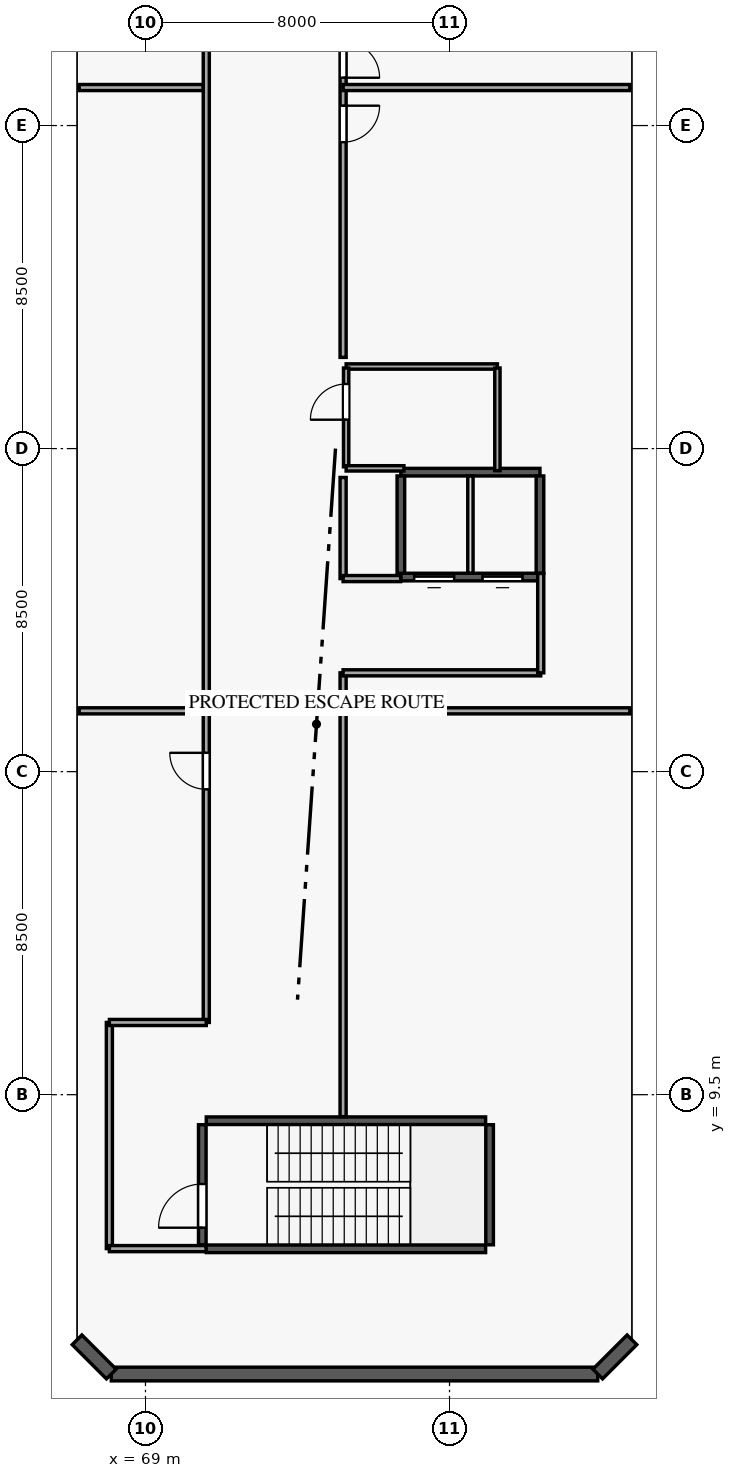
"""IFC4 building model, lengths in metres.
Left out: names, types, materials, properties, quantities, classifications, styles, units other than length and angle.
Written with IfcOpenShell. Run it as: python <this file> out.ifc"""

import sys

from ifc_helpers import new_model, si_unit, direction, frame, frame_2d, origin, origin_with_axes, origin_2d, place, context, subcontext, project, spatial, rectangle, circle, extrude, source, transform, mapped, element, fill, save


model = new_model("IFC4")
c1 = context("Model", 3, precision=1e-05, world=origin(), true_north=direction((0.0, 1.0)))
c2 = subcontext(c1, "Body", "Model", "MODEL_VIEW")
j1 = project(units=[si_unit("LENGTHUNIT", "METRE"), si_unit("PLANEANGLEUNIT", "RADIAN")], contexts=[c1])
p1 = place(None, origin())
s1 = spatial("IfcSite", under=j1, at=p1, CompositionType="ELEMENT")
p2 = place(p1, origin())
s2 = spatial("IfcBuilding", under=s1, at=p2, CompositionType="ELEMENT")
p3 = place(p2, frame((0.0, 0.0, 9.0)))
s3 = spatial("IfcBuildingStorey", under=s2, at=p3, CompositionType="ELEMENT", Elevation=9.0)
m1 = source(origin_with_axes(), c2, "Body", "SweptSolid", [
    extrude(circle(Radius=0.375, at=origin_2d()), origin(), (0.0, 0.0, 1.0), 4.5),
])
for number, where, z_axis, x_axis in (
    (1, (69.6, 3.05, 0.0), (0.0, 0.0, 1.0), (1.0, 0.0, 0.0)),
    (2, (75.4, 3.05, 0.0), (0.0, 0.0, 1.0), (1.0, 0.0, 0.0)),
    (3, (81.2, 3.05, 0.0), (0.0, 0.0, 1.0), (1.0, 0.0, 0.0)),
    (4, (69.6, 4.8, 0.0), (0.0, 0.0, 1.0), (1.0, 0.0, 0.0)),
    (5, (69.6, 12.0, 0.0), (0.0, 0.0, 1.0), (1.0, 0.0, 0.0)),
    (6, (69.6, 19.2, 0.0), (0.0, 0.0, 1.0), (1.0, 0.0, 0.0)),
    (7, (69.6, 26.5, 0.0), (0.0, 0.0, 1.0), (1.0, 0.0, 0.0)),
    (8, (69.6, 33.8, 0.0), (0.0, 0.0, 1.0), (1.0, 0.0, 0.0)),
):
    element("IfcColumn", number, at=place(p3, frame(where, z_axis=z_axis, x_axis=x_axis)), inside=s3, PredefinedType="COLUMN", context=c2, shape_type="MappedRepresentation", body=[
        mapped(m1, transform((0.0, 0.0, 0.0), scale=1.0)),
    ])
m2 = source(origin_with_axes(), c2, "Body", "SweptSolid", [
    extrude(circle(Radius=0.425, at=origin_2d()), origin(), (0.0, 0.0, 1.0), 4.5),
])
for number, where, z_axis, x_axis in (
    (9, (75.4, 4.8, 0.0), (0.0, 0.0, 1.0), (1.0, 0.0, 0.0)),
    (10, (75.4, 12.0, 0.0), (0.0, 0.0, 1.0), (1.0, 0.0, 0.0)),
    (11, (75.4, 19.2, 0.0), (0.0, 0.0, 1.0), (1.0, 0.0, 0.0)),
    (12, (75.4, 26.5, 0.0), (0.0, 0.0, 1.0), (1.0, 0.0, 0.0)),
    (13, (75.4, 33.8, 0.0), (0.0, 0.0, 1.0), (1.0, 0.0, 0.0)),
):
    element("IfcColumn", number, at=place(p3, frame(where, z_axis=z_axis, x_axis=x_axis)), inside=s3, PredefinedType="COLUMN", context=c2, shape_type="MappedRepresentation", body=[
        mapped(m2, transform((0.0, 0.0, 0.0), scale=1.0)),
    ])
for number, where, z_axis, x_axis in (
    (14, (81.2, 4.8, 0.0), (0.0, 0.0, 1.0), (1.0, 0.0, 0.0)),
    (15, (81.2, 12.0, 0.0), (0.0, 0.0, 1.0), (1.0, 0.0, 0.0)),
    (16, (81.2, 19.2, 0.0), (0.0, 0.0, 1.0), (1.0, 0.0, 0.0)),
    (17, (81.2, 26.5, 0.0), (0.0, 0.0, 1.0), (1.0, 0.0, 0.0)),
    (18, (81.2, 33.8, 0.0), (0.0, 0.0, 1.0), (1.0, 0.0, 0.0)),
):
    element("IfcColumn", number, at=place(p3, frame(where, z_axis=z_axis, x_axis=x_axis)), inside=s3, PredefinedType="COLUMN", context=c2, shape_type="MappedRepresentation", body=[
        mapped(m1, transform((0.0, 0.0, 0.0), scale=1.0)),
    ])
m3 = source(origin_with_axes(), c2, "Body", "SweptSolid", [
    extrude(rectangle(XDim=0.5, YDim=0.75, at=origin_2d()), origin(), (0.0, 0.0, 1.0), 4.5),
])
p4 = place(p3, frame((72.5, 12.0, 0.0), z_axis=(0.0, 0.0, 1.0), x_axis=(1.0, 0.0, 0.0)))
e19 = element("IfcColumn", 19, at=p4, inside=s3, PredefinedType="PILASTER", context=c2, shape_type="MappedRepresentation", body=[
    mapped(m3, transform((0.0, 0.0, 0.0), scale=1.0)),
])
p5 = place(p3, frame((68.1, 2.15, 0.0), z_axis=(0.0, 0.0, 1.0), x_axis=(1.0, 0.0, 0.0)))
e20 = element("IfcWall", 20, at=p5, inside=s3, PredefinedType="SOLIDWALL", context=c2, shape_type="SweptSolid", body=[
    extrude(rectangle(XDim=12.8, YDim=0.36, at=frame_2d((6.4, 0.0))), origin(), (0.0, 0.0, 1.0), 4.2),
])
p6 = place(p5, frame((2.675, 0.0, 0.85)))
e21 = element("IfcOpeningElement", 21, at=p6, cuts=e20, PredefinedType="OPENING", context=c2, shape_type="SweptSolid", body=[
    extrude(rectangle(XDim=1.6, YDim=2.2, at=frame_2d((0.8, 1.1))), frame((0.0, 0.19, 0.0), z_axis=(0.0, -1.0, 0.0), x_axis=(1.0, 0.0, 0.0)), (0.0, 0.0, 1.0), 0.38),
])
p7 = place(p5, frame((8.525, 0.0, 0.85)))
e22 = element("IfcOpeningElement", 22, at=p7, cuts=e20, PredefinedType="OPENING", context=c2, shape_type="SweptSolid", body=[
    extrude(rectangle(XDim=1.6, YDim=2.2, at=frame_2d((0.8, 1.1))), frame((0.0, 0.19, 0.0), z_axis=(0.0, -1.0, 0.0), x_axis=(1.0, 0.0, 0.0)), (0.0, 0.0, 1.0), 0.38),
])
for number, where, z_axis, x_axis in (
    (23, (80.9, 2.15, 0.0), (0.0, 0.0, 1.0), (0.707, 0.707, 0.0)),
    (24, (67.2, 3.05, 0.0), (0.0, 0.0, 1.0), (0.707, -0.707, 0.0)),
):
    element("IfcWall", number, at=place(p3, frame(where, z_axis=z_axis, x_axis=x_axis)), inside=s3, PredefinedType="SOLIDWALL", context=c2, shape_type="SweptSolid", body=[
        extrude(rectangle(XDim=1.273, YDim=0.36, at=frame_2d((0.636, 0.0))), origin(), (0.0, 0.0, 1.0), 4.2),
    ])
for number, where, z_axis, x_axis in (
    (25, (70.6, 5.445, 0.0), (0.0, 0.0, 1.0), (1.0, 0.0, 0.0)),
    (26, (70.6, 8.815, 0.0), (0.0, 0.0, 1.0), (1.0, 0.0, 0.0)),
):
    element("IfcWall", number, at=place(p3, frame(where, z_axis=z_axis, x_axis=x_axis)), inside=s3, PredefinedType="SHEAR", context=c2, shape_type="SweptSolid", body=[
        extrude(rectangle(XDim=7.35, YDim=0.2, at=frame_2d((3.675, 0.0))), origin(), (0.0, 0.0, 1.0), 4.2),
    ])
p8 = place(p3, frame((75.72, 23.12, 0.0), z_axis=(0.0, 0.0, 1.0), x_axis=(1.0, 0.0, 0.0)))
e27 = element("IfcWall", 27, at=p8, inside=s3, PredefinedType="SHEAR", context=c2, shape_type="SweptSolid", body=[
    extrude(rectangle(XDim=3.66, YDim=0.2, at=frame_2d((1.83, 0.0))), origin(), (0.0, 0.0, 1.0), 4.2),
])
p9 = place(p8, frame((0.35, 0.0, 0.0)))
e28 = element("IfcOpeningElement", 28, at=p9, cuts=e27, PredefinedType="OPENING", context=c2, shape_type="SweptSolid", body=[
    extrude(rectangle(XDim=1.05, YDim=2.15, at=frame_2d((0.525, 1.075))), frame((0.0, 0.11, 0.0), z_axis=(0.0, -1.0, 0.0), x_axis=(1.0, 0.0, 0.0)), (0.0, 0.0, 1.0), 0.22),
])
p10 = place(p8, frame((2.15, 0.0, 0.0)))
e29 = element("IfcOpeningElement", 29, at=p10, cuts=e27, PredefinedType="OPENING", context=c2, shape_type="SweptSolid", body=[
    extrude(rectangle(XDim=1.05, YDim=2.15, at=frame_2d((0.525, 1.075))), frame((0.0, 0.11, 0.0), z_axis=(0.0, -1.0, 0.0), x_axis=(1.0, 0.0, 0.0)), (0.0, 0.0, 1.0), 0.22),
])
p11 = place(p3, frame((75.72, 25.88, 0.0), z_axis=(0.0, 0.0, 1.0), x_axis=(1.0, 0.0, 0.0)))
e30 = element("IfcWall", 30, at=p11, inside=s3, PredefinedType="SHEAR", context=c2, shape_type="SweptSolid", body=[
    extrude(rectangle(XDim=3.66, YDim=0.2, at=frame_2d((1.83, 0.0))), origin(), (0.0, 0.0, 1.0), 4.2),
])
p12 = place(p3, frame((70.495, 5.55, 0.0), z_axis=(0.0, 0.0, 1.0), x_axis=(0.0, 1.0, 0.0)))
e31 = element("IfcWall", 31, at=p12, inside=s3, PredefinedType="SHEAR", context=c2, shape_type="SweptSolid", body=[
    extrude(rectangle(XDim=3.16, YDim=0.2, at=frame_2d((1.58, 0.0))), origin(), (0.0, 0.0, 1.0), 4.2),
])
p13 = place(p12, frame((0.45, 0.0, 0.0)))
e32 = element("IfcOpeningElement", 32, at=p13, cuts=e31, PredefinedType="OPENING", context=c2, shape_type="SweptSolid", body=[
    extrude(rectangle(XDim=1.15, YDim=2.15, at=frame_2d((0.575, 1.075))), frame((0.0, 0.11, 0.0), z_axis=(0.0, -1.0, 0.0), x_axis=(1.0, 0.0, 0.0)), (0.0, 0.0, 1.0), 0.22),
])
p14 = place(p3, frame((78.055, 5.55, 0.0), z_axis=(0.0, 0.0, 1.0), x_axis=(0.0, 1.0, 0.0)))
e33 = element("IfcWall", 33, at=p14, inside=s3, PredefinedType="SHEAR", context=c2, shape_type="SweptSolid", body=[
    extrude(rectangle(XDim=3.16, YDim=0.2, at=frame_2d((1.58, 0.0))), origin(), (0.0, 0.0, 1.0), 4.2),
])
for number, where, z_axis, x_axis in (
    (34, (75.72, 23.22, 0.0), (0.0, 0.0, 1.0), (0.0, 1.0, 0.0)),
    (35, (79.38, 23.22, 0.0), (0.0, 0.0, 1.0), (0.0, 1.0, 0.0)),
):
    element("IfcWall", number, at=place(p3, frame(where, z_axis=z_axis, x_axis=x_axis)), inside=s3, PredefinedType="SHEAR", context=c2, shape_type="SweptSolid", body=[
        extrude(rectangle(XDim=2.56, YDim=0.2, at=frame_2d((1.28, 0.0))), origin(), (0.0, 0.0, 1.0), 4.2),
    ])
p15 = place(p3, frame((70.6, 11.4, 0.0), z_axis=(0.0, 0.0, 1.0), x_axis=(0.0, 1.0, 0.0)))
e36 = element("IfcWall", 36, at=p15, inside=s3, PredefinedType="PARTITIONING", context=c2, shape_type="SweptSolid", body=[
    extrude(rectangle(XDim=30.2, YDim=0.16, at=frame_2d((15.1, 0.0))), origin(), (0.0, 0.0, 1.0), 4.2),
])
p16 = place(p15, frame((6.135, 0.0, 0.0)))
e37 = element("IfcOpeningElement", 37, at=p16, cuts=e36, PredefinedType="OPENING", context=c2, shape_type="SweptSolid", body=[
    extrude(rectangle(XDim=0.96, YDim=2.15, at=frame_2d((0.48, 1.075))), frame((0.0, 0.09, 0.0), z_axis=(0.0, -1.0, 0.0), x_axis=(1.0, 0.0, 0.0)), (0.0, 0.0, 1.0), 0.18),
])
p17 = place(p3, frame((74.2, 44.038, 0.0), z_axis=(0.0, 0.0, 1.0), x_axis=(0.0, -1.0, 0.0)))
e38 = element("IfcWall", 38, at=p17, inside=s3, PredefinedType="PARTITIONING", context=c2, shape_type="SweptSolid", body=[
    extrude(rectangle(XDim=15.138, YDim=0.16, at=frame_2d((7.569, 0.0))), origin(), (0.0, 0.0, 1.0), 4.2),
])
p18 = place(p17, frame((8.515, 0.0, 0.0)))
e39 = element("IfcOpeningElement", 39, at=p18, cuts=e38, PredefinedType="OPENING", context=c2, shape_type="SweptSolid", body=[
    extrude(rectangle(XDim=0.96, YDim=2.15, at=frame_2d((0.48, 1.075))), frame((0.0, 0.09, 0.0), z_axis=(0.0, -1.0, 0.0), x_axis=(1.0, 0.0, 0.0)), (0.0, 0.0, 1.0), 0.18),
])
p19 = place(p17, frame((6.82, 0.0, 0.0)))
e40 = element("IfcOpeningElement", 40, at=p19, cuts=e38, PredefinedType="OPENING", context=c2, shape_type="SweptSolid", body=[
    extrude(rectangle(XDim=0.96, YDim=2.15, at=frame_2d((0.48, 1.075))), frame((0.0, 0.09, 0.0), z_axis=(0.0, -1.0, 0.0), x_axis=(1.0, 0.0, 0.0)), (0.0, 0.0, 1.0), 0.18),
])
p20 = place(p3, frame((74.2, 20.6, 0.0), z_axis=(0.0, 0.0, 1.0), x_axis=(0.0, -1.0, 0.0)))
e41 = element("IfcWall", 41, at=p20, inside=s3, PredefinedType="PARTITIONING", context=c2, shape_type="SweptSolid", body=[
    extrude(rectangle(XDim=11.678, YDim=0.16, at=frame_2d((5.839, 0.0))), origin(), (0.0, 0.0, 1.0), 4.2),
])
p21 = place(p3, frame((74.2, 19.6, 0.0), z_axis=(0.0, 0.0, 1.0), x_axis=(1.0, 0.0, 0.0)))
e42 = element("IfcWall", 42, at=p21, inside=s3, PredefinedType="PARTITIONING", context=c2, shape_type="SweptSolid", body=[
    extrude(rectangle(XDim=7.545, YDim=0.16, at=frame_2d((3.772, 0.0))), origin(), (0.0, 0.0, 1.0), 3.55),
])
p22 = place(p3, frame((74.2, 36.0, 0.0), z_axis=(0.0, 0.0, 1.0), x_axis=(1.0, 0.0, 0.0)))
e43 = element("IfcWall", 43, at=p22, inside=s3, PredefinedType="PARTITIONING", context=c2, shape_type="SweptSolid", body=[
    extrude(rectangle(XDim=7.545, YDim=0.16, at=frame_2d((3.772, 0.0))), origin(), (0.0, 0.0, 1.0), 4.2),
])
p23 = place(p3, frame((68.05, 5.45, 0.0), z_axis=(0.0, 0.0, 1.0), x_axis=(0.0, 1.0, 0.0)))
e44 = element("IfcWall", 44, at=p23, inside=s3, PredefinedType="PARTITIONING", context=c2, shape_type="SweptSolid", body=[
    extrude(rectangle(XDim=5.95, YDim=0.16, at=frame_2d((2.975, 0.0))), origin(), (0.0, 0.0, 1.0), 4.2),
])
p24 = place(p3, frame((79.4, 20.6, 0.0), z_axis=(0.0, 0.0, 1.0), x_axis=(-1.0, 0.0, 0.0)))
e45 = element("IfcWall", 45, at=p24, inside=s3, PredefinedType="PARTITIONING", context=c2, shape_type="SweptSolid", body=[
    extrude(rectangle(XDim=5.2, YDim=0.16, at=frame_2d((2.6, 0.0))), origin(), (0.0, 0.0, 1.0), 4.2),
])
p25 = place(p3, frame((74.28, 28.66, 0.0), z_axis=(0.0, 0.0, 1.0), x_axis=(1.0, 0.0, 0.0)))
e46 = element("IfcWall", 46, at=p25, inside=s3, PredefinedType="PARTITIONING", context=c2, shape_type="SweptSolid", body=[
    extrude(rectangle(XDim=3.98, YDim=0.14, at=frame_2d((1.99, 0.0))), origin(), (0.0, 0.0, 1.0), 4.2),
])
p26 = place(p3, frame((67.255, 19.6, 0.0), z_axis=(0.0, 0.0, 1.0), x_axis=(1.0, 0.0, 0.0)))
e47 = element("IfcWall", 47, at=p26, inside=s3, PredefinedType="PARTITIONING", context=c2, shape_type="SweptSolid", body=[
    extrude(rectangle(XDim=3.26, YDim=0.16, at=frame_2d((1.63, 0.0))), origin(), (0.0, 0.0, 1.0), 3.55),
])
p27 = place(p3, frame((67.255, 36.0, 0.0), z_axis=(0.0, 0.0, 1.0), x_axis=(1.0, 0.0, 0.0)))
e48 = element("IfcWall", 48, at=p27, inside=s3, PredefinedType="PARTITIONING", context=c2, shape_type="SweptSolid", body=[
    extrude(rectangle(XDim=3.26, YDim=0.16, at=frame_2d((1.63, 0.0))), origin(), (0.0, 0.0, 1.0), 4.2),
])
p28 = place(p3, frame((78.26, 25.92, 0.0), z_axis=(0.0, 0.0, 1.0), x_axis=(0.0, 1.0, 0.0)))
e49 = element("IfcWall", 49, at=p28, inside=s3, PredefinedType="PARTITIONING", context=c2, shape_type="SweptSolid", body=[
    extrude(rectangle(XDim=2.7, YDim=0.14, at=frame_2d((1.35, 0.0))), origin(), (0.0, 0.0, 1.0), 4.2),
])
p29 = place(p3, frame((74.2, 25.74, 0.0), z_axis=(0.0, 0.0, 1.0), x_axis=(0.0, -1.0, 0.0)))
e50 = element("IfcWall", 50, at=p29, inside=s3, PredefinedType="PARTITIONING", context=c2, shape_type="SweptSolid", body=[
    extrude(rectangle(XDim=2.66, YDim=0.16, at=frame_2d((1.33, 0.0))), origin(), (0.0, 0.0, 1.0), 4.2),
])
p30 = place(p3, frame((74.28, 26.02, 0.0), z_axis=(0.0, 0.0, 1.0), x_axis=(0.0, 1.0, 0.0)))
e51 = element("IfcWall", 51, at=p30, inside=s3, PredefinedType="PARTITIONING", context=c2, shape_type="SweptSolid", body=[
    extrude(rectangle(XDim=2.6, YDim=0.14, at=frame_2d((1.3, 0.0))), origin(), (0.0, 0.0, 1.0), 4.2),
])
p31 = place(p30, frame((1.24, 0.0, 0.0)))
e52 = element("IfcOpeningElement", 52, at=p31, cuts=e51, PredefinedType="OPENING", context=c2, shape_type="SweptSolid", body=[
    extrude(rectangle(XDim=0.94, YDim=2.1, at=frame_2d((0.47, 1.05))), frame((0.0, 0.08, 0.0), z_axis=(0.0, -1.0, 0.0), x_axis=(1.0, 0.0, 0.0)), (0.0, 0.0, 1.0), 0.16),
])
p32 = place(p3, frame((77.55, 23.22, 0.0), z_axis=(0.0, 0.0, 1.0), x_axis=(0.0, 1.0, 0.0)))
e53 = element("IfcWall", 53, at=p32, inside=s3, PredefinedType="PARTITIONING", context=c2, shape_type="SweptSolid", body=[
    extrude(rectangle(XDim=2.56, YDim=0.14, at=frame_2d((1.28, 0.0))), origin(), (0.0, 0.0, 1.0), 4.2),
])
p33 = place(p3, frame((68.05, 11.4, 0.0), z_axis=(0.0, 0.0, 1.0), x_axis=(1.0, 0.0, 0.0)))
e54 = element("IfcWall", 54, at=p33, inside=s3, PredefinedType="PARTITIONING", context=c2, shape_type="SweptSolid", body=[
    extrude(rectangle(XDim=2.55, YDim=0.16, at=frame_2d((1.275, 0.0))), origin(), (0.0, 0.0, 1.0), 3.55),
])
p34 = place(p3, frame((79.4, 23.215, 0.0), z_axis=(0.0, 0.0, 1.0), x_axis=(0.0, -1.0, 0.0)))
e55 = element("IfcWall", 55, at=p34, inside=s3, PredefinedType="PARTITIONING", context=c2, shape_type="SweptSolid", body=[
    extrude(rectangle(XDim=2.615, YDim=0.16, at=frame_2d((1.308, 0.0))), origin(), (0.0, 0.0, 1.0), 4.2),
])
p35 = place(p3, frame((70.595, 5.45, 0.0), z_axis=(0.0, 0.0, 1.0), x_axis=(-1.0, 0.0, 0.0)))
e56 = element("IfcWall", 56, at=p35, inside=s3, PredefinedType="PARTITIONING", context=c2, shape_type="SweptSolid", body=[
    extrude(rectangle(XDim=2.545, YDim=0.16, at=frame_2d((1.272, 0.0))), origin(), (0.0, 0.0, 1.0), 3.55),
])
p36 = place(p3, frame((74.28, 25.98, 0.0), z_axis=(0.0, 0.0, 1.0), x_axis=(1.0, 0.0, 0.0)))
e57 = element("IfcWall", 57, at=p36, inside=s3, PredefinedType="PARTITIONING", context=c2, shape_type="SweptSolid", body=[
    extrude(rectangle(XDim=1.52, YDim=0.14, at=frame_2d((0.76, 0.0))), origin(), (0.0, 0.0, 1.0), 3.55),
])
p37 = place(p3, frame((74.2, 23.08, 0.0), z_axis=(0.0, 0.0, 1.0), x_axis=(1.0, 0.0, 0.0)))
e58 = element("IfcWall", 58, at=p37, inside=s3, PredefinedType="PARTITIONING", context=c2, shape_type="SweptSolid", body=[
    extrude(rectangle(XDim=1.515, YDim=0.16, at=frame_2d((0.758, 0.0))), origin(), (0.0, 0.0, 1.0), 3.7),
])
m4 = source(origin_with_axes(), c2, "Body", "SweptSolid", [
    extrude(rectangle(XDim=1.6, YDim=2.2, at=frame_2d((0.8, 1.1))), frame((0.0, 0.03, 0.0), z_axis=(0.0, -1.0, 0.0), x_axis=(1.0, 0.0, 0.0)), (0.0, 0.0, 1.0), 0.06),
])
p38 = place(p6, origin())
e59 = element("IfcWindow", 59, at=p38, inside=s3, PartitioningType="SINGLE_PANEL", PredefinedType="WINDOW", context=c2, shape_type="MappedRepresentation", body=[
    mapped(m4, transform((0.0, 0.0, 0.0), scale=1.0)),
])
fill(e21, e59)
p39 = place(p7, origin())
e60 = element("IfcWindow", 60, at=p39, inside=s3, PartitioningType="SINGLE_PANEL", PredefinedType="WINDOW", context=c2, shape_type="MappedRepresentation", body=[
    mapped(m4, transform((0.0, 0.0, 0.0), scale=1.0)),
])
fill(e22, e60)
m5 = source(origin_with_axes(), c2, "Body", "SweptSolid", [
    extrude(rectangle(XDim=1.15, YDim=2.15, at=frame_2d((0.575, 1.075))), frame((0.0, 0.025, 0.0), z_axis=(0.0, -1.0, 0.0), x_axis=(1.0, 0.0, 0.0)), (0.0, 0.0, 1.0), 0.05),
])
p40 = place(p13, origin())
e61 = element("IfcDoor", 61, at=p40, inside=s3, OperationType="SINGLE_SWING_LEFT", PredefinedType="DOOR", context=c2, shape_type="MappedRepresentation", body=[
    mapped(m5, transform((0.0, 0.0, 0.0), scale=1.0)),
])
fill(e32, e61)
m6 = source(origin_with_axes(), c2, "Body", "SweptSolid", [
    extrude(rectangle(XDim=1.05, YDim=2.15, at=frame_2d((0.525, 1.075))), frame((0.0, 0.025, 0.0), z_axis=(0.0, -1.0, 0.0), x_axis=(1.0, 0.0, 0.0)), (0.0, 0.0, 1.0), 0.05),
])
p41 = place(p9, origin())
e62 = element("IfcDoor", 62, at=p41, inside=s3, OperationType="SLIDING_TO_LEFT", PredefinedType="DOOR", context=c2, shape_type="MappedRepresentation", body=[
    mapped(m6, transform((0.0, 0.0, 0.0), scale=1.0)),
])
fill(e28, e62)
p42 = place(p10, origin())
e63 = element("IfcDoor", 63, at=p42, inside=s3, OperationType="SLIDING_TO_RIGHT", PredefinedType="DOOR", context=c2, shape_type="MappedRepresentation", body=[
    mapped(m6, transform((0.0, 0.0, 0.0), scale=1.0)),
])
fill(e29, e63)
m7 = source(origin_with_axes(), c2, "Body", "SweptSolid", [
    extrude(rectangle(XDim=0.94, YDim=2.1, at=frame_2d((0.47, 1.05))), frame((0.0, 0.025, 0.0), z_axis=(0.0, -1.0, 0.0), x_axis=(1.0, 0.0, 0.0)), (0.0, 0.0, 1.0), 0.05),
])
p43 = place(p31, origin())
e64 = element("IfcDoor", 64, at=p43, inside=s3, OperationType="SINGLE_SWING_LEFT", PredefinedType="DOOR", context=c2, shape_type="MappedRepresentation", body=[
    mapped(m7, transform((0.0, 0.0, 0.0), scale=1.0)),
])
fill(e52, e64)
m8 = source(origin_with_axes(), c2, "Body", "SweptSolid", [
    extrude(rectangle(XDim=0.96, YDim=2.15, at=frame_2d((0.48, 1.075))), frame((0.0, 0.025, 0.0), z_axis=(0.0, -1.0, 0.0), x_axis=(1.0, 0.0, 0.0)), (0.0, 0.0, 1.0), 0.05),
])
p44 = place(p16, origin())
e65 = element("IfcDoor", 65, at=p44, inside=s3, OperationType="SINGLE_SWING_RIGHT", PredefinedType="DOOR", context=c2, shape_type="MappedRepresentation", body=[
    mapped(m8, transform((0.0, 0.0, 0.0), scale=1.0)),
])
fill(e37, e65)
p45 = place(p18, origin())
e66 = element("IfcDoor", 66, at=p45, inside=s3, OperationType="SINGLE_SWING_LEFT", PredefinedType="DOOR", context=c2, shape_type="MappedRepresentation", body=[
    mapped(m8, transform((0.0, 0.0, 0.0), scale=1.0)),
])
fill(e39, e66)
p46 = place(p19, origin())
e67 = element("IfcDoor", 67, at=p46, inside=s3, OperationType="SINGLE_SWING_RIGHT", PredefinedType="DOOR", context=c2, shape_type="MappedRepresentation", body=[
    mapped(m8, transform((0.0, 0.0, 0.0), scale=1.0)),
])
fill(e40, e67)
save(model, sys.argv[1])
